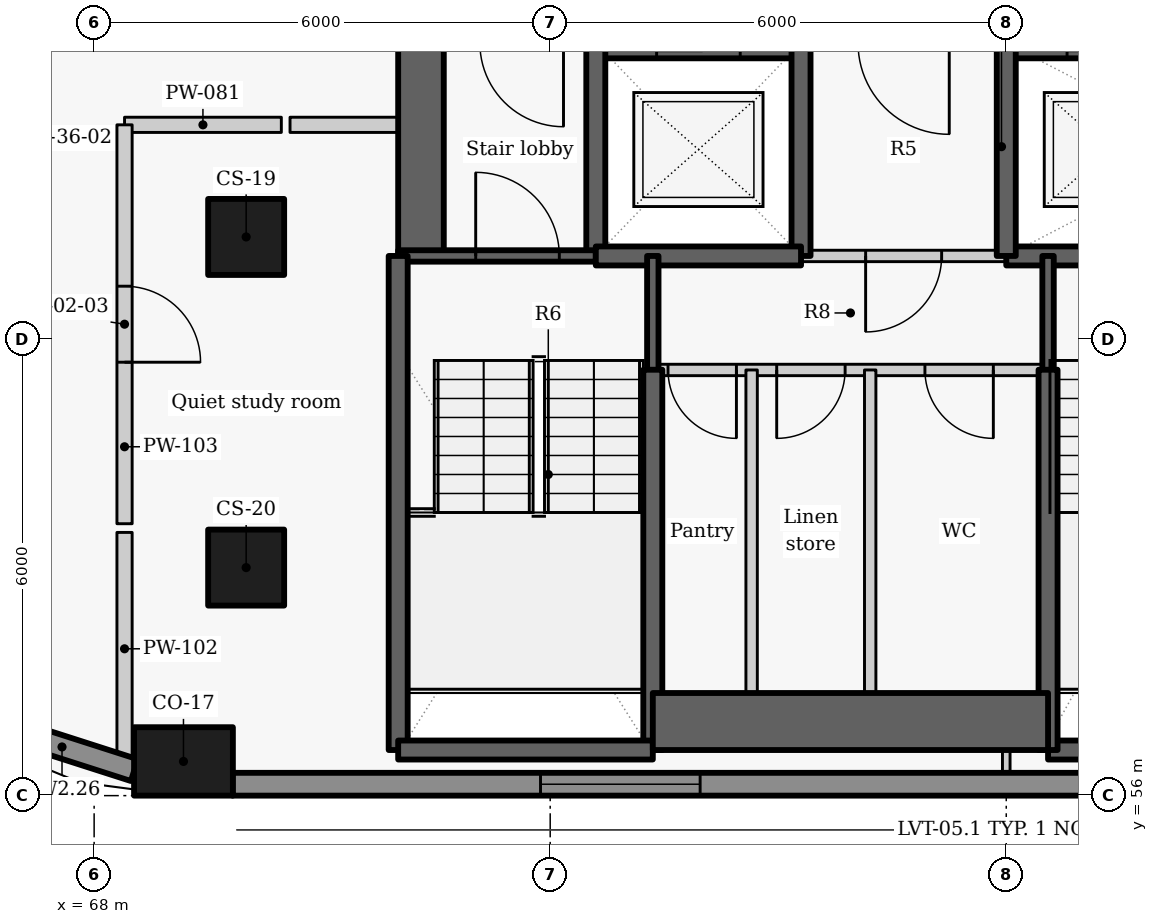
"""IFC4 building model, lengths in metres.
Left out: names, types, materials, properties, quantities, classifications, styles, units other than length and angle.
Written with IfcOpenShell. Run it as: python <this file> out.ifc"""

import sys

from ifc_helpers import new_model, si_unit, direction, frame, frame_2d, origin, origin_2d, place, context, subcontext, project, spatial, rectangle, extrude, element, fill, save


model = new_model("IFC4")
c1 = context("Model", 3, precision=1e-05, world=origin(), true_north=direction((0.0, 1.0)))
c2 = subcontext(c1, "Body", "Model", "MODEL_VIEW")
j1 = project(units=[si_unit("LENGTHUNIT", "METRE"), si_unit("PLANEANGLEUNIT", "RADIAN")], contexts=[c1])
p1 = place(None, origin())
s1 = spatial("IfcSite", under=j1, at=p1, CompositionType="ELEMENT")
p2 = place(p1, origin())
s2 = spatial("IfcBuilding", under=s1, at=p2, CompositionType="ELEMENT")
p3 = place(p2, frame((0.0, 0.0, 166.8)))
s3 = spatial("IfcBuildingStorey", under=s2, at=p3, CompositionType="ELEMENT", Elevation=166.8)
p4 = place(p3, frame((69.175, 56.45, 0.0), z_axis=(0.0, 0.0, 1.0), x_axis=(1.0, 0.0, 0.0)))
e1 = element("IfcColumn", 1, at=p4, inside=s3, PredefinedType="COLUMN", context=c2, shape_type="SweptSolid", body=[
    extrude(rectangle(XDim=1.3, YDim=0.9, at=origin_2d()), origin(), (0.0, 0.0, 1.0), 3.3),
])
for number, where, z_axis, x_axis in (
    (2, (70.0, 63.35, 0.0), (0.0, 0.0, 1.0), (0.0, -1.0, 0.0)),
    (3, (70.0, 59.0, 0.0), (0.0, 0.0, 1.0), (0.0, -1.0, 0.0)),
):
    element("IfcColumn", number, at=place(p3, frame(where, z_axis=z_axis, x_axis=x_axis)), inside=s3, PredefinedType="COLUMN", context=c2, shape_type="SweptSolid", body=[
        extrude(rectangle(XDim=1.0, YDim=1.0, at=origin_2d()), origin(), (0.0, 0.0, 1.0), 3.3),
    ])
p5 = place(p3, frame((66.626, 56.946, 0.0), z_axis=(0.0, 0.0, 1.0), x_axis=(0.952201240673, -0.305471434444, 0.0)))
e4 = element("IfcWall", 4, at=p5, inside=s3, PredefinedType="SOLIDWALL", context=c2, shape_type="SweptSolid", body=[
    extrude(rectangle(XDim=1.999, YDim=0.3, at=frame_2d((1.0, 0.0))), origin(), (0.0, 0.0, 1.0), 2.05),
])
p6 = place(p3, frame((69.821, 56.15, 0.0), z_axis=(0.0, 0.0, 1.0), x_axis=(1.0, 0.0, 0.0)))
e5 = element("IfcWall", 5, at=p6, inside=s3, PredefinedType="SOLIDWALL", context=c2, shape_type="SweptSolid", body=[
    extrude(rectangle(XDim=20.04, YDim=0.3, at=frame_2d((10.02, 0.0))), origin(), (0.0, 0.0, 1.0), 2.05),
])
p7 = place(p6, frame((4.051, 0.0, 0.9)))
e6 = element("IfcOpeningElement", 6, at=p7, cuts=e5, PredefinedType="OPENING", context=c2, shape_type="SweptSolid", body=[
    extrude(rectangle(XDim=2.1, YDim=1.1, at=frame_2d((1.05, 0.55))), frame((0.0, 0.16, 0.0), z_axis=(0.0, -1.0, 0.0), x_axis=(1.0, 0.0, 0.0)), (0.0, 0.0, 1.0), 0.32),
])
p8 = place(p6, frame((14.047, 0.0, 0.9)))
e7 = element("IfcOpeningElement", 7, at=p8, cuts=e5, PredefinedType="OPENING", context=c2, shape_type="SweptSolid", body=[
    extrude(rectangle(XDim=2.1, YDim=1.1, at=frame_2d((1.05, 0.55))), frame((0.0, 0.16, 0.0), z_axis=(0.0, -1.0, 0.0), x_axis=(1.0, 0.0, 0.0)), (0.0, 0.0, 1.0), 0.32),
])
p9 = place(p3, frame((72.3, 63.1, -0.275), z_axis=(0.0, 0.0, 1.0), x_axis=(0.0, 1.0, 0.0)))
e8 = element("IfcWall", 8, at=p9, inside=s3, PredefinedType="SHEAR", context=c2, shape_type="SweptSolid", body=[
    extrude(rectangle(XDim=9.1, YDim=0.6, at=frame_2d((4.55, 0.0))), origin(), (0.0, 0.0, 1.0), 3.225),
])
p10 = place(p9, frame((3.748, 0.0, 0.275)))
e9 = element("IfcOpeningElement", 9, at=p10, cuts=e8, PredefinedType="OPENING", context=c2, shape_type="SweptSolid", body=[
    extrude(rectangle(XDim=1.5, YDim=2.1, at=frame_2d((0.75, 1.05))), frame((0.0, 0.31, 0.0), z_axis=(0.0, -1.0, 0.0), x_axis=(1.0, 0.0, 0.0)), (0.0, 0.0, 1.0), 0.62),
])
p11 = place(p3, frame((74.597, 65.9, -0.275), z_axis=(0.0, 0.0, 1.0), x_axis=(1.0, 0.0, 0.0)))
e10 = element("IfcWall", 10, at=p11, inside=s3, PredefinedType="SHEAR", context=c2, shape_type="SweptSolid", body=[
    extrude(rectangle(XDim=2.706, YDim=0.4, at=frame_2d((1.353, 0.0))), origin(), (0.0, 0.0, 1.0), 3.225),
])
p12 = place(p11, frame((0.803, 0.0, 0.275)))
e11 = element("IfcOpeningElement", 11, at=p12, cuts=e10, PredefinedType="OPENING", context=c2, shape_type="SweptSolid", body=[
    extrude(rectangle(XDim=1.1, YDim=2.1, at=frame_2d((0.55, 1.05))), frame((0.0, 0.21, 0.0), z_axis=(0.0, -1.0, 0.0), x_axis=(1.0, 0.0, 0.0)), (0.0, 0.0, 1.0), 0.42),
])
p13 = place(p3, frame((79.997, 65.9, -0.275), z_axis=(0.0, 0.0, 1.0), x_axis=(1.0, 0.0, 0.0)))
e12 = element("IfcWall", 12, at=p13, inside=s3, PredefinedType="SHEAR", context=c2, shape_type="SweptSolid", body=[
    extrude(rectangle(XDim=5.406, YDim=0.4, at=frame_2d((2.703, 0.0))), origin(), (0.0, 0.0, 1.0), 3.225),
])
p14 = place(p13, frame((0.803, 0.0, 0.275)))
e13 = element("IfcOpeningElement", 13, at=p14, cuts=e12, PredefinedType="OPENING", context=c2, shape_type="SweptSolid", body=[
    extrude(rectangle(XDim=1.1, YDim=2.1, at=frame_2d((0.55, 1.05))), frame((0.0, 0.21, 0.0), z_axis=(0.0, -1.0, 0.0), x_axis=(1.0, 0.0, 0.0)), (0.0, 0.0, 1.0), 0.42),
])
p15 = place(p3, frame((74.6, 63.1, -0.275), z_axis=(0.0, 0.0, 1.0), x_axis=(0.0, 1.0, 0.0)))
e14 = element("IfcWall", 14, at=p15, inside=s3, PredefinedType="SHEAR", context=c2, shape_type="SweptSolid", body=[
    extrude(rectangle(XDim=2.8, YDim=0.25, at=frame_2d((1.4, 0.0))), origin(), (0.0, 0.0, 1.0), 3.225),
])
p16 = place(p3, frame((72.0, 63.1, -0.275), z_axis=(0.0, 0.0, 1.0), x_axis=(1.0, 0.0, 0.0)))
e15 = element("IfcWall", 15, at=p16, inside=s3, PredefinedType="SHEAR", context=c2, shape_type="SweptSolid", body=[
    extrude(rectangle(XDim=2.6, YDim=0.15, at=frame_2d((1.3, 0.0))), origin(), (0.0, 0.0, 1.0), 3.225),
])
p17 = place(p16, frame((1.02, 0.0, 0.275)))
e16 = element("IfcOpeningElement", 16, at=p17, cuts=e15, PredefinedType="OPENING", context=c2, shape_type="SweptSolid", body=[
    extrude(rectangle(XDim=1.1, YDim=2.1, at=frame_2d((0.55, 1.05))), frame((0.0, 0.085, 0.0), z_axis=(0.0, -1.0, 0.0), x_axis=(1.0, 0.0, 0.0)), (0.0, 0.0, 1.0), 0.17),
])
p18 = place(p3, frame((77.3, 63.1, -0.275), z_axis=(0.0, 0.0, 1.0), x_axis=(0.0, 1.0, 0.0)))
e17 = element("IfcWall", 17, at=p18, inside=s3, PredefinedType="SHEAR", context=c2, shape_type="SweptSolid", body=[
    extrude(rectangle(XDim=2.8, YDim=0.25, at=frame_2d((1.4, 0.0))), origin(), (0.0, 0.0, 1.0), 3.225),
])
p19 = place(p3, frame((74.6, 63.1, -0.275), z_axis=(0.0, 0.0, 1.0), x_axis=(1.0, 0.0, 0.0)))
e18 = element("IfcWall", 18, at=p19, inside=s3, PredefinedType="SHEAR", context=c2, shape_type="SweptSolid", body=[
    extrude(rectangle(XDim=2.7, YDim=0.25, at=frame_2d((1.35, 0.0))), origin(), (0.0, 0.0, 1.0), 3.225),
])
p20 = place(p3, frame((80.0, 63.1, -0.275), z_axis=(0.0, 0.0, 1.0), x_axis=(1.0, 0.0, 0.0)))
e19 = element("IfcWall", 19, at=p20, inside=s3, PredefinedType="SHEAR", context=c2, shape_type="SweptSolid", body=[
    extrude(rectangle(XDim=8.0, YDim=0.25, at=frame_2d((4.0, 0.0))), origin(), (0.0, 0.0, 1.0), 3.225),
])
p21 = place(p20, frame((3.849, 0.0, 0.275)))
e20 = element("IfcOpeningElement", 20, at=p21, cuts=e19, PredefinedType="OPENING", context=c2, shape_type="SweptSolid", body=[
    extrude(rectangle(XDim=1.1, YDim=2.1, at=frame_2d((0.55, 1.05))), frame((0.0, 0.135, 0.0), z_axis=(0.0, -1.0, 0.0), x_axis=(1.0, 0.0, 0.0)), (0.0, 0.0, 1.0), 0.27),
])
p22 = place(p3, frame((80.0, 63.1, -0.275), z_axis=(0.0, 0.0, 1.0), x_axis=(0.0, 1.0, 0.0)))
e21 = element("IfcWall", 21, at=p22, inside=s3, PredefinedType="SHEAR", context=c2, shape_type="SweptSolid", body=[
    extrude(rectangle(XDim=2.8, YDim=0.25, at=frame_2d((1.4, 0.0))), origin(), (0.0, 0.0, 1.0), 3.225),
])
p23 = place(p3, frame((80.0, 63.1, 0.0), z_axis=(0.0, 0.0, 1.0), x_axis=(-1.0, 0.0, 0.0)))
e22 = element("IfcWall", 22, at=p23, inside=s3, PredefinedType="PARTITIONING", context=c2, shape_type="SweptSolid", body=[
    extrude(rectangle(XDim=2.7, YDim=0.15, at=frame_2d((1.35, 0.0))), origin(), (0.0, 0.0, 1.0), 2.95),
])
p24 = place(p23, frame((0.85, 0.0, 0.0)))
e23 = element("IfcOpeningElement", 23, at=p24, cuts=e22, PredefinedType="OPENING", context=c2, shape_type="SweptSolid", body=[
    extrude(rectangle(XDim=1.0, YDim=2.1, at=frame_2d((0.5, 1.05))), frame((0.0, 0.085, 0.0), z_axis=(0.0, -1.0, 0.0), x_axis=(1.0, 0.0, 0.0)), (0.0, 0.0, 1.0), 0.17),
])
p25 = place(p3, frame((75.35, 61.597, -0.275), z_axis=(0.0, 0.0, 1.0), x_axis=(0.0, 1.0, 0.0)))
e24 = element("IfcWall", 24, at=p25, inside=s3, PredefinedType="SHEAR", context=c2, shape_type="SweptSolid", body=[
    extrude(rectangle(XDim=1.503, YDim=0.15, at=frame_2d((0.751, 0.0))), origin(), (0.0, 0.0, 1.0), 3.225),
])
p26 = place(p3, frame((75.35, 56.6, -0.275), z_axis=(0.0, 0.0, 1.0), x_axis=(0.0, 1.0, 0.0)))
e25 = element("IfcWall", 25, at=p26, inside=s3, PredefinedType="SHEAR", context=c2, shape_type="SweptSolid", body=[
    extrude(rectangle(XDim=5.003, YDim=0.25, at=frame_2d((2.501, 0.0))), origin(), (0.0, 0.0, 1.0), 3.225),
])
p27 = place(p3, frame((72.0, 56.6, -0.275), z_axis=(0.0, 0.0, 1.0), x_axis=(0.0, 1.0, 0.0)))
e26 = element("IfcWall", 26, at=p27, inside=s3, PredefinedType="SHEAR", context=c2, shape_type="SweptSolid", body=[
    extrude(rectangle(XDim=6.5, YDim=0.25, at=frame_2d((3.25, 0.0))), origin(), (0.0, 0.0, 1.0), 3.225),
])
p28 = place(p3, frame((72.0, 56.6, -0.275), z_axis=(0.0, 0.0, 1.0), x_axis=(1.0, 0.0, 0.0)))
e27 = element("IfcWall", 27, at=p28, inside=s3, PredefinedType="SHEAR", context=c2, shape_type="SweptSolid", body=[
    extrude(rectangle(XDim=3.35, YDim=0.25, at=frame_2d((1.675, 0.0))), origin(), (0.0, 0.0, 1.0), 3.225),
])
p29 = place(p3, frame((80.55, 56.6, -0.275), z_axis=(0.0, 0.0, 1.0), x_axis=(1.0, 0.0, 0.0)))
e28 = element("IfcWall", 28, at=p29, inside=s3, PredefinedType="SHEAR", context=c2, shape_type="SweptSolid", body=[
    extrude(rectangle(XDim=2.85, YDim=0.25, at=frame_2d((1.425, 0.0))), origin(), (0.0, 0.0, 1.0), 3.225),
])
p30 = place(p3, frame((80.55, 61.597, -0.275), z_axis=(0.0, 0.0, 1.0), x_axis=(0.0, 1.0, 0.0)))
e29 = element("IfcWall", 29, at=p30, inside=s3, PredefinedType="SHEAR", context=c2, shape_type="SweptSolid", body=[
    extrude(rectangle(XDim=1.503, YDim=0.15, at=frame_2d((0.751, 0.0))), origin(), (0.0, 0.0, 1.0), 3.225),
])
p31 = place(p3, frame((80.55, 56.6, -0.275), z_axis=(0.0, 0.0, 1.0), x_axis=(0.0, 1.0, 0.0)))
e30 = element("IfcWall", 30, at=p31, inside=s3, PredefinedType="SHEAR", context=c2, shape_type="SweptSolid", body=[
    extrude(rectangle(XDim=5.003, YDim=0.25, at=frame_2d((2.501, 0.0))), origin(), (0.0, 0.0, 1.0), 3.225),
])
p32 = place(p3, frame((75.35, 56.975, -0.275), z_axis=(0.0, 0.0, 1.0), x_axis=(1.0, 0.0, 0.0)))
e31 = element("IfcWall", 31, at=p32, inside=s3, PredefinedType="SHEAR", context=c2, shape_type="SweptSolid", body=[
    extrude(rectangle(XDim=5.2, YDim=0.75, at=frame_2d((2.6, 0.0))), origin(), (0.0, 0.0, 1.0), 3.225),
])
p33 = place(p3, frame((80.55, 61.6, 0.0), z_axis=(0.0, 0.0, 1.0), x_axis=(-1.0, 0.0, 0.0)))
e32 = element("IfcWall", 32, at=p33, inside=s3, PredefinedType="PARTITIONING", context=c2, shape_type="SweptSolid", body=[
    extrude(rectangle(XDim=5.2, YDim=0.15, at=frame_2d((2.6, 0.0))), origin(), (0.0, 0.0, 1.0), 2.95),
])
p34 = place(p33, frame((4.1, 0.0, 0.0)))
e33 = element("IfcOpeningElement", 33, at=p34, cuts=e32, PredefinedType="OPENING", context=c2, shape_type="SweptSolid", body=[
    extrude(rectangle(XDim=0.9, YDim=2.1, at=frame_2d((0.45, 1.05))), frame((0.0, 0.085, 0.0), z_axis=(0.0, -1.0, 0.0), x_axis=(1.0, 0.0, 0.0)), (0.0, 0.0, 1.0), 0.17),
])
p35 = place(p33, frame((2.67, 0.0, 0.0)))
e34 = element("IfcOpeningElement", 34, at=p35, cuts=e32, PredefinedType="OPENING", context=c2, shape_type="SweptSolid", body=[
    extrude(rectangle(XDim=0.9, YDim=2.1, at=frame_2d((0.45, 1.05))), frame((0.0, 0.085, 0.0), z_axis=(0.0, -1.0, 0.0), x_axis=(1.0, 0.0, 0.0)), (0.0, 0.0, 1.0), 0.17),
])
p36 = place(p33, frame((0.72, 0.0, 0.0)))
e35 = element("IfcOpeningElement", 35, at=p36, cuts=e32, PredefinedType="OPENING", context=c2, shape_type="SweptSolid", body=[
    extrude(rectangle(XDim=0.9, YDim=2.1, at=frame_2d((0.45, 1.05))), frame((0.0, 0.085, 0.0), z_axis=(0.0, -1.0, 0.0), x_axis=(1.0, 0.0, 0.0)), (0.0, 0.0, 1.0), 0.17),
])
for number, where, z_axis, x_axis in (
    (36, (76.65, 56.6, 0.0), (0.0, 0.0, 1.0), (0.0, 1.0, 0.0)),
    (37, (78.21, 56.6, 0.0), (0.0, 0.0, 1.0), (0.0, 1.0, 0.0)),
):
    element("IfcWall", number, at=place(p3, frame(where, z_axis=z_axis, x_axis=x_axis)), inside=s3, PredefinedType="PARTITIONING", context=c2, shape_type="SweptSolid", body=[
        extrude(rectangle(XDim=5.0, YDim=0.15, at=frame_2d((2.5, 0.0))), origin(), (0.0, 0.0, 1.0), 2.95),
    ])
p37 = place(p3, frame((68.4, 64.825, 0.0), z_axis=(0.0, 0.0, 1.0), x_axis=(1.0, 0.0, 0.0)))
e38 = element("IfcWall", 38, at=p37, inside=s3, PredefinedType="PARTITIONING", context=c2, shape_type="SweptSolid", body=[
    extrude(rectangle(XDim=2.063, YDim=0.2, at=frame_2d((1.031, 0.0))), origin(), (0.0, 0.0, 1.0), 2.43),
])
p38 = place(p3, frame((70.577, 64.825, 0.0), z_axis=(0.0, 0.0, 1.0), x_axis=(1.0, 0.0, 0.0)))
e39 = element("IfcWall", 39, at=p38, inside=s3, PredefinedType="PARTITIONING", context=c2, shape_type="SweptSolid", body=[
    extrude(rectangle(XDim=1.423, YDim=0.2, at=frame_2d((0.711, 0.0))), origin(), (0.0, 0.0, 1.0), 2.95),
])
p39 = place(p3, frame((68.4, 56.401, 0.0), z_axis=(0.0, 0.0, 1.0), x_axis=(0.0, 1.0, 0.0)))
e40 = element("IfcWall", 40, at=p39, inside=s3, PredefinedType="PARTITIONING", context=c2, shape_type="SweptSolid", body=[
    extrude(rectangle(XDim=3.062, YDim=0.2, at=frame_2d((1.531, 0.0))), origin(), (0.0, 0.0, 1.0), 2.03),
])
p40 = place(p3, frame((68.4, 64.825, 0.0), z_axis=(0.0, 0.0, 1.0), x_axis=(0.0, -1.0, 0.0)))
e41 = element("IfcWall", 41, at=p40, inside=s3, PredefinedType="PARTITIONING", context=c2, shape_type="SweptSolid", body=[
    extrude(rectangle(XDim=5.248, YDim=0.2, at=frame_2d((2.624, 0.0))), origin(), (0.0, 0.0, 1.0), 2.95),
])
p41 = place(p40, frame((2.123, 0.0, 0.0)))
e42 = element("IfcOpeningElement", 42, at=p41, cuts=e41, PredefinedType="OPENING", context=c2, shape_type="SweptSolid", body=[
    extrude(rectangle(XDim=1.0, YDim=2.1, at=frame_2d((0.5, 1.05))), frame((0.0, 0.11, 0.0), z_axis=(0.0, -1.0, 0.0), x_axis=(1.0, 0.0, 0.0)), (0.0, 0.0, 1.0), 0.22),
])
p42 = place(p3, frame((80.0, 56.3, 0.0), z_axis=(0.0, 0.0, 1.0), x_axis=(0.0, 1.0, 0.0)))
e43 = element("IfcWall", 43, at=p42, inside=s3, PredefinedType="PARTITIONING", context=c2, shape_type="SweptSolid", body=[
    extrude(rectangle(XDim=0.3, YDim=0.1, at=frame_2d((0.15, 0.0))), origin(), (0.0, 0.0, 1.0), 2.95),
])
p43 = place(p7, origin())
e44 = element("IfcWindow", 44, at=p43, inside=s3, PartitioningType="SINGLE_PANEL", PredefinedType="WINDOW", context=c2, shape_type="SweptSolid", body=[
    extrude(rectangle(XDim=2.1, YDim=1.1, at=frame_2d((1.05, 0.55))), frame((0.0, 0.03, 0.0), z_axis=(0.0, -1.0, 0.0), x_axis=(1.0, 0.0, 0.0)), (0.0, 0.0, 1.0), 0.06),
])
fill(e6, e44)
p44 = place(p24, origin())
e45 = element("IfcDoor", 45, at=p44, inside=s3, OperationType="SINGLE_SWING_RIGHT", PredefinedType="DOOR", context=c2, shape_type="SweptSolid", body=[
    extrude(rectangle(XDim=1.0, YDim=2.1, at=frame_2d((0.5, 1.05))), frame((0.0, 0.025, 0.0), z_axis=(0.0, -1.0, 0.0), x_axis=(1.0, 0.0, 0.0)), (0.0, 0.0, 1.0), 0.05),
])
fill(e23, e45)
p45 = place(p34, origin())
e46 = element("IfcDoor", 46, at=p45, inside=s3, OperationType="SINGLE_SWING_LEFT", PredefinedType="DOOR", context=c2, shape_type="SweptSolid", body=[
    extrude(rectangle(XDim=0.9, YDim=2.1, at=frame_2d((0.45, 1.05))), frame((0.0, 0.025, 0.0), z_axis=(0.0, -1.0, 0.0), x_axis=(1.0, 0.0, 0.0)), (0.0, 0.0, 1.0), 0.05),
])
fill(e33, e46)
p46 = place(p35, origin())
e47 = element("IfcDoor", 47, at=p46, inside=s3, OperationType="SINGLE_SWING_RIGHT", PredefinedType="DOOR", context=c2, shape_type="SweptSolid", body=[
    extrude(rectangle(XDim=0.9, YDim=2.1, at=frame_2d((0.45, 1.05))), frame((0.0, 0.025, 0.0), z_axis=(0.0, -1.0, 0.0), x_axis=(1.0, 0.0, 0.0)), (0.0, 0.0, 1.0), 0.05),
])
fill(e34, e47)
p47 = place(p36, origin())
e48 = element("IfcDoor", 48, at=p47, inside=s3, OperationType="SINGLE_SWING_LEFT", PredefinedType="DOOR", context=c2, shape_type="SweptSolid", body=[
    extrude(rectangle(XDim=0.9, YDim=2.1, at=frame_2d((0.45, 1.05))), frame((0.0, 0.025, 0.0), z_axis=(0.0, -1.0, 0.0), x_axis=(1.0, 0.0, 0.0)), (0.0, 0.0, 1.0), 0.05),
])
fill(e35, e48)
p48 = place(p17, origin())
e49 = element("IfcDoor", 49, at=p48, inside=s3, OperationType="SINGLE_SWING_LEFT", PredefinedType="DOOR", context=c2, shape_type="SweptSolid", body=[
    extrude(rectangle(XDim=1.1, YDim=2.1, at=frame_2d((0.55, 1.05))), frame((0.0, 0.025, 0.0), z_axis=(0.0, -1.0, 0.0), x_axis=(1.0, 0.0, 0.0)), (0.0, 0.0, 1.0), 0.05),
])
fill(e16, e49)
p49 = place(p41, origin())
e50 = element("IfcDoor", 50, at=p49, inside=s3, OperationType="SINGLE_SWING_RIGHT", PredefinedType="DOOR", context=c2, shape_type="SweptSolid", body=[
    extrude(rectangle(XDim=1.0, YDim=2.1, at=frame_2d((0.5, 1.05))), frame((0.0, 0.025, 0.0), z_axis=(0.0, -1.0, 0.0), x_axis=(1.0, 0.0, 0.0)), (0.0, 0.0, 1.0), 0.05),
])
fill(e42, e50)
save(model, sys.argv[1])
